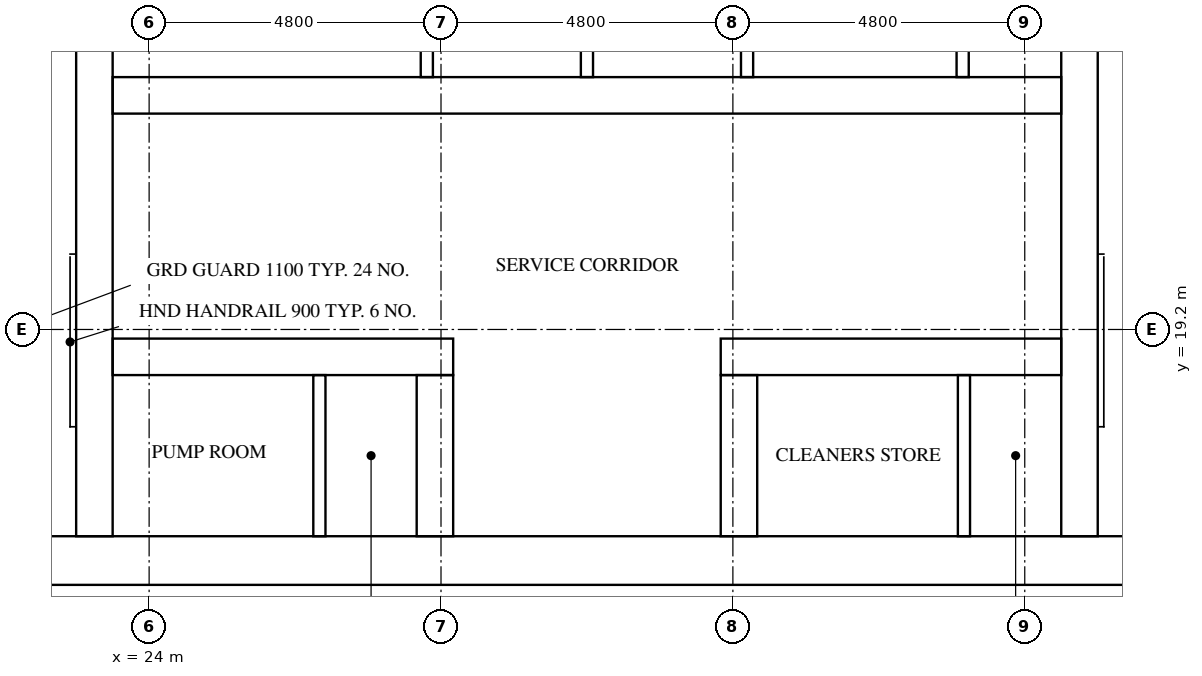
"""IFC4 building model, lengths in metres.
Left out: names, types, materials, properties, quantities, classifications, styles, units other than length and angle.
Written with IfcOpenShell. Run it as: python <this file> out.ifc"""

import sys

from ifc_helpers import new_model, si_unit, direction, frame, frame_2d, origin, place, context, subcontext, project, spatial, rectangle, extrude, element, fill, save


model = new_model("IFC4")
c1 = context("Model", 3, precision=1e-05, world=origin(), true_north=direction((0.0, 1.0)))
c2 = subcontext(c1, "Body", "Model", "MODEL_VIEW")
j1 = project(units=[si_unit("LENGTHUNIT", "METRE"), si_unit("PLANEANGLEUNIT", "RADIAN")], contexts=[c1])
p1 = place(None, origin())
s1 = spatial("IfcSite", under=j1, at=p1, CompositionType="ELEMENT")
p2 = place(p1, origin())
s2 = spatial("IfcBuilding", under=s1, at=p2, CompositionType="ELEMENT")
p3 = place(p2, frame((0.0, 0.0, 149.0)))
s3 = spatial("IfcBuildingStorey", under=s2, at=p3, CompositionType="ELEMENT", Elevation=149.0)
p4 = place(p3, frame((15.0, 15.4, 0.0), z_axis=(0.0, 0.0, 1.0), x_axis=(1.0, 0.0, 0.0)))
e1 = element("IfcWall", 1, at=p4, inside=s3, PredefinedType="SHEAR", context=c2, shape_type="SweptSolid", body=[
    extrude(rectangle(XDim=32.4, YDim=0.8, at=frame_2d((16.2, 0.0))), origin(), (0.0, 0.0, 1.0), 3.2),
])
p5 = place(p4, frame((15.3, 0.0, 0.0)))
e2 = element("IfcOpeningElement", 2, at=p5, cuts=e1, PredefinedType="OPENING", context=c2, shape_type="SweptSolid", body=[
    extrude(rectangle(XDim=1.8, YDim=2.1, at=frame_2d((0.9, 1.05))), frame((0.0, 0.41, 0.0), z_axis=(0.0, -1.0, 0.0), x_axis=(1.0, 0.0, 0.0)), (0.0, 0.0, 1.0), 0.82),
])
p6 = place(p3, frame((23.1, 15.8, 0.0), z_axis=(0.0, 0.0, 1.0), x_axis=(0.0, 1.0, 0.0)))
e3 = element("IfcWall", 3, at=p6, inside=s3, PredefinedType="SHEAR", context=c2, shape_type="SweptSolid", body=[
    extrude(rectangle(XDim=21.2, YDim=0.6, at=frame_2d((10.6, 0.0))), origin(), (0.0, 0.0, 1.0), 3.2),
])
p7 = place(p3, frame((39.3, 15.8, 0.0), z_axis=(0.0, 0.0, 1.0), x_axis=(0.0, 1.0, 0.0)))
e4 = element("IfcWall", 4, at=p7, inside=s3, PredefinedType="SHEAR", context=c2, shape_type="SweptSolid", body=[
    extrude(rectangle(XDim=8.45, YDim=0.6, at=frame_2d((4.225, 0.0))), origin(), (0.0, 0.0, 1.0), 3.2),
])
p8 = place(p3, frame((23.4, 18.75, 0.0), z_axis=(0.0, 0.0, 1.0), x_axis=(1.0, 0.0, 0.0)))
e5 = element("IfcWall", 5, at=p8, inside=s3, PredefinedType="SHEAR", context=c2, shape_type="SweptSolid", body=[
    extrude(rectangle(XDim=5.6, YDim=0.6, at=frame_2d((2.8, 0.0))), origin(), (0.0, 0.0, 1.0), 3.2),
])
p9 = place(p8, frame((1.15, 0.0, 0.0)))
e6 = element("IfcOpeningElement", 6, at=p9, cuts=e5, PredefinedType="OPENING", context=c2, shape_type="SweptSolid", body=[
    extrude(rectangle(XDim=1.0, YDim=2.1, at=frame_2d((0.5, 1.05))), frame((0.0, 0.31, 0.0), z_axis=(0.0, -1.0, 0.0), x_axis=(1.0, 0.0, 0.0)), (0.0, 0.0, 1.0), 0.62),
])
p10 = place(p8, frame((3.75, 0.0, 0.0)))
e7 = element("IfcOpeningElement", 7, at=p10, cuts=e5, PredefinedType="OPENING", context=c2, shape_type="SweptSolid", body=[
    extrude(rectangle(XDim=1.0, YDim=2.1, at=frame_2d((0.5, 1.05))), frame((0.0, 0.31, 0.0), z_axis=(0.0, -1.0, 0.0), x_axis=(1.0, 0.0, 0.0)), (0.0, 0.0, 1.0), 0.62),
])
p11 = place(p3, frame((33.4, 18.75, 0.0), z_axis=(0.0, 0.0, 1.0), x_axis=(1.0, 0.0, 0.0)))
e8 = element("IfcWall", 8, at=p11, inside=s3, PredefinedType="SHEAR", context=c2, shape_type="SweptSolid", body=[
    extrude(rectangle(XDim=5.6, YDim=0.6, at=frame_2d((2.8, 0.0))), origin(), (0.0, 0.0, 1.0), 3.2),
])
p12 = place(p11, frame((1.75, 0.0, 0.0)))
e9 = element("IfcOpeningElement", 9, at=p12, cuts=e8, PredefinedType="OPENING", context=c2, shape_type="SweptSolid", body=[
    extrude(rectangle(XDim=1.0, YDim=2.1, at=frame_2d((0.5, 1.05))), frame((0.0, 0.31, 0.0), z_axis=(0.0, -1.0, 0.0), x_axis=(1.0, 0.0, 0.0)), (0.0, 0.0, 1.0), 0.62),
])
p13 = place(p11, frame((4.35, 0.0, 0.0)))
e10 = element("IfcOpeningElement", 10, at=p13, cuts=e8, PredefinedType="OPENING", context=c2, shape_type="SweptSolid", body=[
    extrude(rectangle(XDim=1.0, YDim=2.1, at=frame_2d((0.5, 1.05))), frame((0.0, 0.31, 0.0), z_axis=(0.0, -1.0, 0.0), x_axis=(1.0, 0.0, 0.0)), (0.0, 0.0, 1.0), 0.62),
])
p14 = place(p3, frame((23.4, 23.05, 0.0), z_axis=(0.0, 0.0, 1.0), x_axis=(1.0, 0.0, 0.0)))
e11 = element("IfcWall", 11, at=p14, inside=s3, PredefinedType="SHEAR", context=c2, shape_type="SweptSolid", body=[
    extrude(rectangle(XDim=15.6, YDim=0.6, at=frame_2d((7.8, 0.0))), origin(), (0.0, 0.0, 1.0), 3.2),
])
p15 = place(p14, frame((2.033, 0.0, 0.0)))
e12 = element("IfcOpeningElement", 12, at=p15, cuts=e11, PredefinedType="OPENING", context=c2, shape_type="SweptSolid", body=[
    extrude(rectangle(XDim=1.0, YDim=2.1, at=frame_2d((0.5, 1.05))), frame((0.0, 0.31, 0.0), z_axis=(0.0, -1.0, 0.0), x_axis=(1.0, 0.0, 0.0)), (0.0, 0.0, 1.0), 0.62),
])
p16 = place(p14, frame((11.706, 0.0, 0.0)))
e13 = element("IfcOpeningElement", 13, at=p16, cuts=e11, PredefinedType="OPENING", context=c2, shape_type="SweptSolid", body=[
    extrude(rectangle(XDim=1.0, YDim=2.1, at=frame_2d((0.5, 1.05))), frame((0.0, 0.31, 0.0), z_axis=(0.0, -1.0, 0.0), x_axis=(1.0, 0.0, 0.0)), (0.0, 0.0, 1.0), 0.62),
])
p17 = place(p14, frame((14.339, 0.0, 0.0)))
e14 = element("IfcOpeningElement", 14, at=p17, cuts=e11, PredefinedType="OPENING", context=c2, shape_type="SweptSolid", body=[
    extrude(rectangle(XDim=1.0, YDim=2.1, at=frame_2d((0.5, 1.05))), frame((0.0, 0.31, 0.0), z_axis=(0.0, -1.0, 0.0), x_axis=(1.0, 0.0, 0.0)), (0.0, 0.0, 1.0), 0.62),
])
for number, where, z_axis, x_axis in (
    (15, (28.7, 15.8, 0.0), (0.0, 0.0, 1.0), (0.0, 1.0, 0.0)),
    (16, (33.7, 15.8, 0.0), (0.0, 0.0, 1.0), (0.0, 1.0, 0.0)),
):
    element("IfcWall", number, at=place(p3, frame(where, z_axis=z_axis, x_axis=x_axis)), inside=s3, PredefinedType="SHEAR", context=c2, shape_type="SweptSolid", body=[
        extrude(rectangle(XDim=2.65, YDim=0.6, at=frame_2d((1.325, 0.0))), origin(), (0.0, 0.0, 1.0), 3.2),
    ])
for number, where, z_axis, x_axis in (
    (17, (28.567, 23.35, 0.0), (0.0, 0.0, 1.0), (0.0, 1.0, 0.0)),
    (18, (31.2, 23.35, 0.0), (0.0, 0.0, 1.0), (0.0, 1.0, 0.0)),
    (19, (33.833, 23.35, 0.0), (0.0, 0.0, 1.0), (0.0, 1.0, 0.0)),
):
    element("IfcWall", number, at=place(p3, frame(where, z_axis=z_axis, x_axis=x_axis)), inside=s3, PredefinedType="SOLIDWALL", context=c2, shape_type="SweptSolid", body=[
        extrude(rectangle(XDim=2.5, YDim=0.2, at=frame_2d((1.25, 0.0))), origin(), (0.0, 0.0, 1.0), 3.2),
    ])
p18 = place(p3, frame((37.379, 23.35, 0.0), z_axis=(0.0, 0.0, 1.0), x_axis=(0.0, 1.0, 0.0)))
e20 = element("IfcWall", 20, at=p18, inside=s3, PredefinedType="PARTITIONING", context=c2, shape_type="SweptSolid", body=[
    extrude(rectangle(XDim=2.5, YDim=0.2, at=frame_2d((1.25, 0.0))), origin(), (0.0, 0.0, 1.0), 3.2),
])
for number, where, z_axis, x_axis in (
    (21, (26.8, 15.8, 0.0), (0.0, 0.0, 1.0), (0.0, 1.0, 0.0)),
    (22, (37.4, 15.8, 0.0), (0.0, 0.0, 1.0), (0.0, 1.0, 0.0)),
):
    element("IfcWall", number, at=place(p3, frame(where, z_axis=z_axis, x_axis=x_axis)), inside=s3, PredefinedType="PARTITIONING", context=c2, shape_type="SweptSolid", body=[
        extrude(rectangle(XDim=2.65, YDim=0.2, at=frame_2d((1.325, 0.0))), origin(), (0.0, 0.0, 1.0), 3.2),
    ])
p19 = place(p5, frame((1.8, 0.0, 0.0), z_axis=(0.0, 0.0, 1.0), x_axis=(-1.0, 0.0, 0.0)))
e23 = element("IfcDoor", 23, at=p19, inside=s3, OperationType="DOUBLE_DOOR_SINGLE_SWING", PredefinedType="DOOR", context=c2, shape_type="SweptSolid", body=[
    extrude(rectangle(XDim=1.8, YDim=2.1, at=frame_2d((0.9, 1.05))), frame((0.0, 0.025, 0.0), z_axis=(0.0, -1.0, 0.0), x_axis=(1.0, 0.0, 0.0)), (0.0, 0.0, 1.0), 0.05),
])
fill(e2, e23)
p20 = place(p15, frame((1.0, 0.0, 0.0), z_axis=(0.0, 0.0, 1.0), x_axis=(-1.0, 0.0, 0.0)))
e24 = element("IfcDoor", 24, at=p20, inside=s3, OperationType="SINGLE_SWING_LEFT", PredefinedType="DOOR", context=c2, shape_type="SweptSolid", body=[
    extrude(rectangle(XDim=1.0, YDim=2.1, at=frame_2d((0.5, 1.05))), frame((0.0, 0.025, 0.0), z_axis=(0.0, -1.0, 0.0), x_axis=(1.0, 0.0, 0.0)), (0.0, 0.0, 1.0), 0.05),
])
fill(e12, e24)
p21 = place(p16, frame((1.0, 0.0, 0.0), z_axis=(0.0, 0.0, 1.0), x_axis=(-1.0, 0.0, 0.0)))
e25 = element("IfcDoor", 25, at=p21, inside=s3, OperationType="SINGLE_SWING_RIGHT", PredefinedType="DOOR", context=c2, shape_type="SweptSolid", body=[
    extrude(rectangle(XDim=1.0, YDim=2.1, at=frame_2d((0.5, 1.05))), frame((0.0, 0.025, 0.0), z_axis=(0.0, -1.0, 0.0), x_axis=(1.0, 0.0, 0.0)), (0.0, 0.0, 1.0), 0.05),
])
fill(e13, e25)
p22 = place(p17, frame((1.0, 0.0, 0.0), z_axis=(0.0, 0.0, 1.0), x_axis=(-1.0, 0.0, 0.0)))
e26 = element("IfcDoor", 26, at=p22, inside=s3, OperationType="SINGLE_SWING_LEFT", PredefinedType="DOOR", context=c2, shape_type="SweptSolid", body=[
    extrude(rectangle(XDim=1.0, YDim=2.1, at=frame_2d((0.5, 1.05))), frame((0.0, 0.025, 0.0), z_axis=(0.0, -1.0, 0.0), x_axis=(1.0, 0.0, 0.0)), (0.0, 0.0, 1.0), 0.05),
])
fill(e14, e26)
p23 = place(p9, origin())
e27 = element("IfcDoor", 27, at=p23, inside=s3, OperationType="SINGLE_SWING_RIGHT", PredefinedType="DOOR", context=c2, shape_type="SweptSolid", body=[
    extrude(rectangle(XDim=1.0, YDim=2.1, at=frame_2d((0.5, 1.05))), frame((0.0, 0.025, 0.0), z_axis=(0.0, -1.0, 0.0), x_axis=(1.0, 0.0, 0.0)), (0.0, 0.0, 1.0), 0.05),
])
fill(e6, e27)
p24 = place(p10, origin())
e28 = element("IfcDoor", 28, at=p24, inside=s3, OperationType="SINGLE_SWING_LEFT", PredefinedType="DOOR", context=c2, shape_type="SweptSolid", body=[
    extrude(rectangle(XDim=1.0, YDim=2.1, at=frame_2d((0.5, 1.05))), frame((0.0, 0.025, 0.0), z_axis=(0.0, -1.0, 0.0), x_axis=(1.0, 0.0, 0.0)), (0.0, 0.0, 1.0), 0.05),
])
fill(e7, e28)
p25 = place(p12, origin())
e29 = element("IfcDoor", 29, at=p25, inside=s3, OperationType="SINGLE_SWING_RIGHT", PredefinedType="DOOR", context=c2, shape_type="SweptSolid", body=[
    extrude(rectangle(XDim=1.0, YDim=2.1, at=frame_2d((0.5, 1.05))), frame((0.0, 0.025, 0.0), z_axis=(0.0, -1.0, 0.0), x_axis=(1.0, 0.0, 0.0)), (0.0, 0.0, 1.0), 0.05),
])
fill(e9, e29)
p26 = place(p13, origin())
e30 = element("IfcDoor", 30, at=p26, inside=s3, OperationType="SINGLE_SWING_LEFT", PredefinedType="DOOR", context=c2, shape_type="SweptSolid", body=[
    extrude(rectangle(XDim=1.0, YDim=2.1, at=frame_2d((0.5, 1.05))), frame((0.0, 0.025, 0.0), z_axis=(0.0, -1.0, 0.0), x_axis=(1.0, 0.0, 0.0)), (0.0, 0.0, 1.0), 0.05),
])
fill(e10, e30)
save(model, sys.argv[1])
